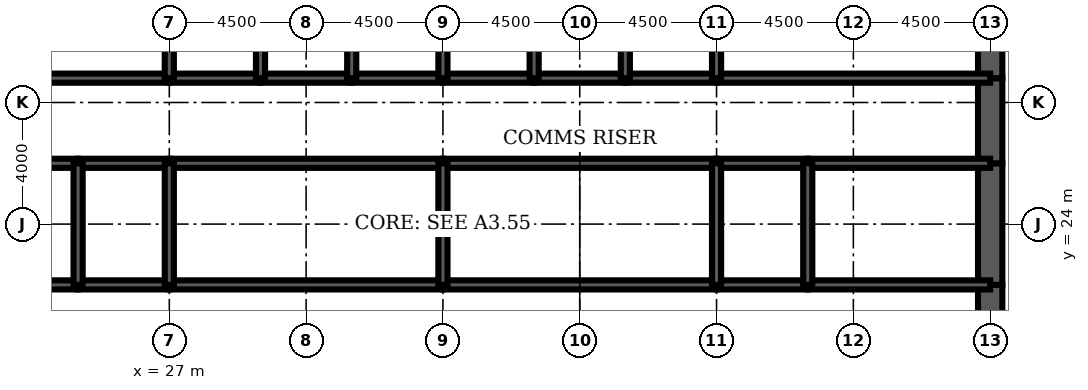
"""IFC4 building model, lengths in metres.
Left out: names, types, materials, properties, quantities, classifications, styles, units other than length and angle.
Written with IfcOpenShell. Run it as: python <this file> out.ifc"""

import sys

from ifc_helpers import new_model, si_unit, direction, frame, frame_2d, origin, place, context, subcontext, project, spatial, rectangle, extrude, element, fill, save


model = new_model("IFC4")
c1 = context("Model", 3, precision=1e-05, world=origin(), true_north=direction((0.0, 1.0)))
c2 = subcontext(c1, "Body", "Model", "MODEL_VIEW")
j1 = project(units=[si_unit("LENGTHUNIT", "METRE"), si_unit("PLANEANGLEUNIT", "RADIAN")], contexts=[c1])
p1 = place(None, origin())
s1 = spatial("IfcSite", under=j1, at=p1, CompositionType="ELEMENT")
p2 = place(p1, origin())
s2 = spatial("IfcBuilding", under=s1, at=p2, CompositionType="ELEMENT")
p3 = place(p2, frame((0.0, 0.0, 236.2)))
s3 = spatial("IfcBuildingStorey", under=s2, at=p3, CompositionType="ELEMENT", Elevation=236.2)
p4 = place(p3, frame((54.0, 19.2, 0.0), z_axis=(0.0, 0.0, 1.0), x_axis=(0.0, 1.0, 0.0)))
e1 = element("IfcWall", 1, at=p4, inside=s3, PredefinedType="SHEAR", context=c2, shape_type="SweptSolid", body=[
    extrude(rectangle(XDim=2.8, YDim=0.8, at=frame_2d((1.4, 0.0))), origin(), (0.0, 0.0, 1.0), 4.2),
])
p5 = place(p4, frame((0.4, 0.0, 0.0)))
e2 = element("IfcOpeningElement", 2, at=p5, cuts=e1, PredefinedType="OPENING", context=c2, shape_type="SweptSolid", body=[
    extrude(rectangle(XDim=1.8, YDim=2.1, at=frame_2d((0.9, 1.05))), frame((0.0, 0.41, 0.0), z_axis=(0.0, -1.0, 0.0), x_axis=(1.0, 0.0, 0.0)), (0.0, 0.0, 1.0), 0.82),
])
p6 = place(p3, frame((54.0, 22.0, 0.0), z_axis=(0.0, 0.0, 1.0), x_axis=(0.0, 1.0, 0.0)))
e3 = element("IfcWall", 3, at=p6, inside=s3, PredefinedType="SHEAR", context=c2, shape_type="SweptSolid", body=[
    extrude(rectangle(XDim=4.0, YDim=0.8, at=frame_2d((2.0, 0.0))), origin(), (0.0, 0.0, 1.0), 4.2),
])
p7 = place(p3, frame((54.0, 26.0, 0.0), z_axis=(0.0, 0.0, 1.0), x_axis=(0.0, 1.0, 0.0)))
e4 = element("IfcWall", 4, at=p7, inside=s3, PredefinedType="SHEAR", context=c2, shape_type="SweptSolid", body=[
    extrude(rectangle(XDim=2.8, YDim=0.8, at=frame_2d((1.4, 0.0))), origin(), (0.0, 0.0, 1.0), 4.2),
])
p8 = place(p7, frame((0.6, 0.0, 0.0)))
e5 = element("IfcOpeningElement", 5, at=p8, cuts=e4, PredefinedType="OPENING", context=c2, shape_type="SweptSolid", body=[
    extrude(rectangle(XDim=1.8, YDim=2.1, at=frame_2d((0.9, 1.05))), frame((0.0, 0.41, 0.0), z_axis=(0.0, -1.0, 0.0), x_axis=(1.0, 0.0, 0.0)), (0.0, 0.0, 1.0), 0.82),
])
p9 = place(p3, frame((54.0, 28.8, 0.0), z_axis=(0.0, 0.0, 1.0), x_axis=(0.0, 1.0, 0.0)))
e6 = element("IfcWall", 6, at=p9, inside=s3, PredefinedType="SHEAR", context=c2, shape_type="SweptSolid", body=[
    extrude(rectangle(XDim=3.2, YDim=0.8, at=frame_2d((1.6, 0.0))), origin(), (0.0, 0.0, 1.0), 4.2),
])
p10 = place(p3, frame((18.0, 28.8, 0.0), z_axis=(0.0, 0.0, 1.0), x_axis=(1.0, 0.0, 0.0)))
e7 = element("IfcWall", 7, at=p10, inside=s3, PredefinedType="SOLIDWALL", context=c2, shape_type="SweptSolid", body=[
    extrude(rectangle(XDim=9.0, YDim=0.3, at=frame_2d((4.5, 0.0))), origin(), (0.0, 0.0, 1.0), 4.2),
])
p11 = place(p10, frame((0.65, 0.0, 0.0)))
e8 = element("IfcOpeningElement", 8, at=p11, cuts=e7, PredefinedType="OPENING", context=c2, shape_type="SweptSolid", body=[
    extrude(rectangle(XDim=1.0, YDim=2.1, at=frame_2d((0.5, 1.05))), frame((0.0, 0.16, 0.0), z_axis=(0.0, -1.0, 0.0), x_axis=(1.0, 0.0, 0.0)), (0.0, 0.0, 1.0), 0.32),
])
p12 = place(p3, frame((27.0, 28.8, 0.0), z_axis=(0.0, 0.0, 1.0), x_axis=(1.0, 0.0, 0.0)))
e9 = element("IfcWall", 9, at=p12, inside=s3, PredefinedType="SOLIDWALL", context=c2, shape_type="SweptSolid", body=[
    extrude(rectangle(XDim=3.0, YDim=0.3, at=frame_2d((1.5, 0.0))), origin(), (0.0, 0.0, 1.0), 4.2),
])
p13 = place(p12, frame((0.95, 0.0, 0.0)))
e10 = element("IfcOpeningElement", 10, at=p13, cuts=e9, PredefinedType="OPENING", context=c2, shape_type="SweptSolid", body=[
    extrude(rectangle(XDim=1.1, YDim=2.2, at=frame_2d((0.55, 1.1))), frame((0.0, 0.16, 0.0), z_axis=(0.0, -1.0, 0.0), x_axis=(1.0, 0.0, 0.0)), (0.0, 0.0, 1.0), 0.32),
])
p14 = place(p3, frame((30.0, 28.8, 0.0), z_axis=(0.0, 0.0, 1.0), x_axis=(1.0, 0.0, 0.0)))
e11 = element("IfcWall", 11, at=p14, inside=s3, PredefinedType="SOLIDWALL", context=c2, shape_type="SweptSolid", body=[
    extrude(rectangle(XDim=3.0, YDim=0.3, at=frame_2d((1.5, 0.0))), origin(), (0.0, 0.0, 1.0), 4.2),
])
p15 = place(p14, frame((0.95, 0.0, 0.0)))
e12 = element("IfcOpeningElement", 12, at=p15, cuts=e11, PredefinedType="OPENING", context=c2, shape_type="SweptSolid", body=[
    extrude(rectangle(XDim=1.1, YDim=2.2, at=frame_2d((0.55, 1.1))), frame((0.0, 0.16, 0.0), z_axis=(0.0, -1.0, 0.0), x_axis=(1.0, 0.0, 0.0)), (0.0, 0.0, 1.0), 0.32),
])
p16 = place(p3, frame((33.0, 28.8, 0.0), z_axis=(0.0, 0.0, 1.0), x_axis=(1.0, 0.0, 0.0)))
e13 = element("IfcWall", 13, at=p16, inside=s3, PredefinedType="SOLIDWALL", context=c2, shape_type="SweptSolid", body=[
    extrude(rectangle(XDim=3.0, YDim=0.3, at=frame_2d((1.5, 0.0))), origin(), (0.0, 0.0, 1.0), 4.2),
])
p17 = place(p16, frame((0.95, 0.0, 0.0)))
e14 = element("IfcOpeningElement", 14, at=p17, cuts=e13, PredefinedType="OPENING", context=c2, shape_type="SweptSolid", body=[
    extrude(rectangle(XDim=1.1, YDim=2.2, at=frame_2d((0.55, 1.1))), frame((0.0, 0.16, 0.0), z_axis=(0.0, -1.0, 0.0), x_axis=(1.0, 0.0, 0.0)), (0.0, 0.0, 1.0), 0.32),
])
for number, where, z_axis, x_axis in (
    (15, (36.0, 28.8, 0.0), (0.0, 0.0, 1.0), (1.0, 0.0, 0.0)),
    (16, (39.0, 28.8, 0.0), (0.0, 0.0, 1.0), (1.0, 0.0, 0.0)),
):
    element("IfcWall", number, at=place(p3, frame(where, z_axis=z_axis, x_axis=x_axis)), inside=s3, PredefinedType="SOLIDWALL", context=c2, shape_type="SweptSolid", body=[
        extrude(rectangle(XDim=3.0, YDim=0.3, at=frame_2d((1.5, 0.0))), origin(), (0.0, 0.0, 1.0), 4.2),
    ])
p18 = place(p3, frame((42.0, 28.8, 0.0), z_axis=(0.0, 0.0, 1.0), x_axis=(1.0, 0.0, 0.0)))
e17 = element("IfcWall", 17, at=p18, inside=s3, PredefinedType="SOLIDWALL", context=c2, shape_type="SweptSolid", body=[
    extrude(rectangle(XDim=3.0, YDim=0.3, at=frame_2d((1.5, 0.0))), origin(), (0.0, 0.0, 1.0), 4.2),
])
p19 = place(p18, frame((0.95, 0.0, 0.0)))
e18 = element("IfcOpeningElement", 18, at=p19, cuts=e17, PredefinedType="OPENING", context=c2, shape_type="SweptSolid", body=[
    extrude(rectangle(XDim=1.1, YDim=2.2, at=frame_2d((0.55, 1.1))), frame((0.0, 0.16, 0.0), z_axis=(0.0, -1.0, 0.0), x_axis=(1.0, 0.0, 0.0)), (0.0, 0.0, 1.0), 0.32),
])
p20 = place(p3, frame((45.0, 28.8, 0.0), z_axis=(0.0, 0.0, 1.0), x_axis=(1.0, 0.0, 0.0)))
e19 = element("IfcWall", 19, at=p20, inside=s3, PredefinedType="SOLIDWALL", context=c2, shape_type="SweptSolid", body=[
    extrude(rectangle(XDim=9.0, YDim=0.3, at=frame_2d((4.5, 0.0))), origin(), (0.0, 0.0, 1.0), 4.2),
])
p21 = place(p20, frame((7.35, 0.0, 0.0)))
e20 = element("IfcOpeningElement", 20, at=p21, cuts=e19, PredefinedType="OPENING", context=c2, shape_type="SweptSolid", body=[
    extrude(rectangle(XDim=1.0, YDim=2.1, at=frame_2d((0.5, 1.05))), frame((0.0, 0.16, 0.0), z_axis=(0.0, -1.0, 0.0), x_axis=(1.0, 0.0, 0.0)), (0.0, 0.0, 1.0), 0.32),
])
p22 = place(p3, frame((18.0, 22.0, 0.0), z_axis=(0.0, 0.0, 1.0), x_axis=(1.0, 0.0, 0.0)))
e21 = element("IfcWall", 21, at=p22, inside=s3, PredefinedType="SOLIDWALL", context=c2, shape_type="SweptSolid", body=[
    extrude(rectangle(XDim=6.0, YDim=0.3, at=frame_2d((3.0, 0.0))), origin(), (0.0, 0.0, 1.0), 4.2),
])
p23 = place(p22, frame((4.4, 0.0, 0.0)))
e22 = element("IfcOpeningElement", 22, at=p23, cuts=e21, PredefinedType="OPENING", context=c2, shape_type="SweptSolid", body=[
    extrude(rectangle(XDim=1.0, YDim=2.1, at=frame_2d((0.5, 1.05))), frame((0.0, 0.16, 0.0), z_axis=(0.0, -1.0, 0.0), x_axis=(1.0, 0.0, 0.0)), (0.0, 0.0, 1.0), 0.32),
])
p24 = place(p22, frame((0.95, 0.0, 0.0)))
e23 = element("IfcOpeningElement", 23, at=p24, cuts=e21, PredefinedType="OPENING", context=c2, shape_type="SweptSolid", body=[
    extrude(rectangle(XDim=1.0, YDim=2.1, at=frame_2d((0.5, 1.05))), frame((0.0, 0.16, 0.0), z_axis=(0.0, -1.0, 0.0), x_axis=(1.0, 0.0, 0.0)), (0.0, 0.0, 1.0), 0.32),
])
p25 = place(p3, frame((24.0, 22.0, 0.0), z_axis=(0.0, 0.0, 1.0), x_axis=(1.0, 0.0, 0.0)))
e24 = element("IfcWall", 24, at=p25, inside=s3, PredefinedType="SOLIDWALL", context=c2, shape_type="SweptSolid", body=[
    extrude(rectangle(XDim=3.0, YDim=0.3, at=frame_2d((1.5, 0.0))), origin(), (0.0, 0.0, 1.0), 4.2),
])
p26 = place(p25, frame((1.0, 0.0, 0.0)))
e25 = element("IfcOpeningElement", 25, at=p26, cuts=e24, PredefinedType="OPENING", context=c2, shape_type="SweptSolid", body=[
    extrude(rectangle(XDim=1.0, YDim=2.1, at=frame_2d((0.5, 1.05))), frame((0.0, 0.16, 0.0), z_axis=(0.0, -1.0, 0.0), x_axis=(1.0, 0.0, 0.0)), (0.0, 0.0, 1.0), 0.32),
])
p27 = place(p3, frame((27.0, 22.0, 0.0), z_axis=(0.0, 0.0, 1.0), x_axis=(1.0, 0.0, 0.0)))
e26 = element("IfcWall", 26, at=p27, inside=s3, PredefinedType="SOLIDWALL", context=c2, shape_type="SweptSolid", body=[
    extrude(rectangle(XDim=9.0, YDim=0.3, at=frame_2d((4.5, 0.0))), origin(), (0.0, 0.0, 1.0), 4.2),
])
p28 = place(p27, frame((4.0, 0.0, 0.0)))
e27 = element("IfcOpeningElement", 27, at=p28, cuts=e26, PredefinedType="OPENING", context=c2, shape_type="SweptSolid", body=[
    extrude(rectangle(XDim=1.0, YDim=2.1, at=frame_2d((0.5, 1.05))), frame((0.0, 0.16, 0.0), z_axis=(0.0, -1.0, 0.0), x_axis=(1.0, 0.0, 0.0)), (0.0, 0.0, 1.0), 0.32),
])
p29 = place(p3, frame((36.0, 22.0, 0.0), z_axis=(0.0, 0.0, 1.0), x_axis=(1.0, 0.0, 0.0)))
e28 = element("IfcWall", 28, at=p29, inside=s3, PredefinedType="SOLIDWALL", context=c2, shape_type="SweptSolid", body=[
    extrude(rectangle(XDim=9.0, YDim=0.3, at=frame_2d((4.5, 0.0))), origin(), (0.0, 0.0, 1.0), 4.2),
])
p30 = place(p29, frame((4.0, 0.0, 0.0)))
e29 = element("IfcOpeningElement", 29, at=p30, cuts=e28, PredefinedType="OPENING", context=c2, shape_type="SweptSolid", body=[
    extrude(rectangle(XDim=1.0, YDim=2.1, at=frame_2d((0.5, 1.05))), frame((0.0, 0.16, 0.0), z_axis=(0.0, -1.0, 0.0), x_axis=(1.0, 0.0, 0.0)), (0.0, 0.0, 1.0), 0.32),
])
p31 = place(p3, frame((45.0, 22.0, 0.0), z_axis=(0.0, 0.0, 1.0), x_axis=(1.0, 0.0, 0.0)))
e30 = element("IfcWall", 30, at=p31, inside=s3, PredefinedType="SOLIDWALL", context=c2, shape_type="SweptSolid", body=[
    extrude(rectangle(XDim=3.0, YDim=0.3, at=frame_2d((1.5, 0.0))), origin(), (0.0, 0.0, 1.0), 4.2),
])
p32 = place(p31, frame((1.0, 0.0, 0.0)))
e31 = element("IfcOpeningElement", 31, at=p32, cuts=e30, PredefinedType="OPENING", context=c2, shape_type="SweptSolid", body=[
    extrude(rectangle(XDim=1.0, YDim=2.1, at=frame_2d((0.5, 1.05))), frame((0.0, 0.16, 0.0), z_axis=(0.0, -1.0, 0.0), x_axis=(1.0, 0.0, 0.0)), (0.0, 0.0, 1.0), 0.32),
])
p33 = place(p3, frame((48.0, 22.0, 0.0), z_axis=(0.0, 0.0, 1.0), x_axis=(1.0, 0.0, 0.0)))
e32 = element("IfcWall", 32, at=p33, inside=s3, PredefinedType="SOLIDWALL", context=c2, shape_type="SweptSolid", body=[
    extrude(rectangle(XDim=6.0, YDim=0.3, at=frame_2d((3.0, 0.0))), origin(), (0.0, 0.0, 1.0), 4.2),
])
p34 = place(p33, frame((2.0, 0.0, 0.0)))
e33 = element("IfcOpeningElement", 33, at=p34, cuts=e32, PredefinedType="OPENING", context=c2, shape_type="SweptSolid", body=[
    extrude(rectangle(XDim=1.0, YDim=2.1, at=frame_2d((0.5, 1.05))), frame((0.0, 0.16, 0.0), z_axis=(0.0, -1.0, 0.0), x_axis=(1.0, 0.0, 0.0)), (0.0, 0.0, 1.0), 0.32),
])
p35 = place(p33, frame((4.05, 0.0, 0.0)))
e34 = element("IfcOpeningElement", 34, at=p35, cuts=e32, PredefinedType="OPENING", context=c2, shape_type="SweptSolid", body=[
    extrude(rectangle(XDim=1.0, YDim=2.1, at=frame_2d((0.5, 1.05))), frame((0.0, 0.16, 0.0), z_axis=(0.0, -1.0, 0.0), x_axis=(1.0, 0.0, 0.0)), (0.0, 0.0, 1.0), 0.32),
])
p36 = place(p3, frame((18.0, 26.0, 0.0), z_axis=(0.0, 0.0, 1.0), x_axis=(1.0, 0.0, 0.0)))
e35 = element("IfcWall", 35, at=p36, inside=s3, PredefinedType="SOLIDWALL", context=c2, shape_type="SweptSolid", body=[
    extrude(rectangle(XDim=6.0, YDim=0.3, at=frame_2d((3.0, 0.0))), origin(), (0.0, 0.0, 1.0), 4.2),
])
p37 = place(p3, frame((24.0, 26.0, 0.0), z_axis=(0.0, 0.0, 1.0), x_axis=(1.0, 0.0, 0.0)))
e36 = element("IfcWall", 36, at=p37, inside=s3, PredefinedType="SOLIDWALL", context=c2, shape_type="SweptSolid", body=[
    extrude(rectangle(XDim=3.0, YDim=0.3, at=frame_2d((1.5, 0.0))), origin(), (0.0, 0.0, 1.0), 4.2),
])
for number, where, z_axis, x_axis in (
    (37, (27.0, 26.0, 0.0), (0.0, 0.0, 1.0), (1.0, 0.0, 0.0)),
    (38, (36.0, 26.0, 0.0), (0.0, 0.0, 1.0), (1.0, 0.0, 0.0)),
):
    element("IfcWall", number, at=place(p3, frame(where, z_axis=z_axis, x_axis=x_axis)), inside=s3, PredefinedType="SOLIDWALL", context=c2, shape_type="SweptSolid", body=[
        extrude(rectangle(XDim=9.0, YDim=0.3, at=frame_2d((4.5, 0.0))), origin(), (0.0, 0.0, 1.0), 4.2),
    ])
p38 = place(p3, frame((45.0, 26.0, 0.0), z_axis=(0.0, 0.0, 1.0), x_axis=(1.0, 0.0, 0.0)))
e39 = element("IfcWall", 39, at=p38, inside=s3, PredefinedType="SOLIDWALL", context=c2, shape_type="SweptSolid", body=[
    extrude(rectangle(XDim=3.0, YDim=0.3, at=frame_2d((1.5, 0.0))), origin(), (0.0, 0.0, 1.0), 4.2),
])
p39 = place(p3, frame((48.0, 26.0, 0.0), z_axis=(0.0, 0.0, 1.0), x_axis=(1.0, 0.0, 0.0)))
e40 = element("IfcWall", 40, at=p39, inside=s3, PredefinedType="SOLIDWALL", context=c2, shape_type="SweptSolid", body=[
    extrude(rectangle(XDim=6.0, YDim=0.3, at=frame_2d((3.0, 0.0))), origin(), (0.0, 0.0, 1.0), 4.2),
])
for number, where, z_axis, x_axis in (
    (41, (27.0, 28.8, 0.0), (0.0, 0.0, 1.0), (0.0, 1.0, 0.0)),
    (42, (30.0, 28.8, 0.0), (0.0, 0.0, 1.0), (0.0, 1.0, 0.0)),
    (43, (33.0, 28.8, 0.0), (0.0, 0.0, 1.0), (0.0, 1.0, 0.0)),
    (44, (36.0, 28.8, 0.0), (0.0, 0.0, 1.0), (0.0, 1.0, 0.0)),
    (45, (39.0, 28.8, 0.0), (0.0, 0.0, 1.0), (0.0, 1.0, 0.0)),
    (46, (42.0, 28.8, 0.0), (0.0, 0.0, 1.0), (0.0, 1.0, 0.0)),
    (47, (45.0, 28.8, 0.0), (0.0, 0.0, 1.0), (0.0, 1.0, 0.0)),
):
    element("IfcWall", number, at=place(p3, frame(where, z_axis=z_axis, x_axis=x_axis)), inside=s3, PredefinedType="SOLIDWALL", context=c2, shape_type="SweptSolid", body=[
        extrude(rectangle(XDim=3.2, YDim=0.3, at=frame_2d((1.6, 0.0))), origin(), (0.0, 0.0, 1.0), 4.2),
    ])
for number, where, z_axis, x_axis in (
    (48, (24.0, 22.0, 0.0), (0.0, 0.0, 1.0), (0.0, 1.0, 0.0)),
    (49, (27.0, 22.0, 0.0), (0.0, 0.0, 1.0), (0.0, 1.0, 0.0)),
    (50, (36.0, 22.0, 0.0), (0.0, 0.0, 1.0), (0.0, 1.0, 0.0)),
    (51, (45.0, 22.0, 0.0), (0.0, 0.0, 1.0), (0.0, 1.0, 0.0)),
    (52, (48.0, 22.0, 0.0), (0.0, 0.0, 1.0), (0.0, 1.0, 0.0)),
):
    element("IfcWall", number, at=place(p3, frame(where, z_axis=z_axis, x_axis=x_axis)), inside=s3, PredefinedType="SOLIDWALL", context=c2, shape_type="SweptSolid", body=[
        extrude(rectangle(XDim=4.0, YDim=0.3, at=frame_2d((2.0, 0.0))), origin(), (0.0, 0.0, 1.0), 4.2),
    ])
p40 = place(p3, frame((51.425, 22.15, 0.0), z_axis=(0.0, 0.0, 1.0), x_axis=(0.0, 1.0, 0.0)))
e53 = element("IfcWall", 53, at=p40, inside=s3, PredefinedType="PARTITIONING", context=c2, shape_type="SweptSolid", body=[
    extrude(rectangle(XDim=3.7, YDim=0.15, at=frame_2d((1.85, 0.0))), origin(), (0.0, 0.0, 1.0), 3.0),
])
p41 = place(p3, frame((47.7, 26.15, 0.0), z_axis=(0.0, 0.0, 1.0), x_axis=(0.0, 1.0, 0.0)))
e54 = element("IfcWall", 54, at=p41, inside=s3, PredefinedType="PARTITIONING", context=c2, shape_type="SweptSolid", body=[
    extrude(rectangle(XDim=2.5, YDim=0.15, at=frame_2d((1.25, 0.0))), origin(), (0.0, 0.0, 1.0), 3.0),
])
p42 = place(p41, frame((1.15, 0.0, 0.0)))
e55 = element("IfcOpeningElement", 55, at=p42, cuts=e54, PredefinedType="OPENING", context=c2, shape_type="SweptSolid", body=[
    extrude(rectangle(XDim=1.0, YDim=2.1, at=frame_2d((0.5, 1.05))), frame((0.0, 0.085, 0.0), z_axis=(0.0, -1.0, 0.0), x_axis=(1.0, 0.0, 0.0)), (0.0, 0.0, 1.0), 0.17),
])
p43 = place(p3, frame((24.5, 19.35, 0.0), z_axis=(0.0, 0.0, 1.0), x_axis=(0.0, 1.0, 0.0)))
e56 = element("IfcWall", 56, at=p43, inside=s3, PredefinedType="PARTITIONING", context=c2, shape_type="SweptSolid", body=[
    extrude(rectangle(XDim=2.5, YDim=0.15, at=frame_2d((1.25, 0.0))), origin(), (0.0, 0.0, 1.0), 3.0),
])
p44 = place(p43, frame((1.15, 0.0, 0.0)))
e57 = element("IfcOpeningElement", 57, at=p44, cuts=e56, PredefinedType="OPENING", context=c2, shape_type="SweptSolid", body=[
    extrude(rectangle(XDim=1.0, YDim=2.1, at=frame_2d((0.5, 1.05))), frame((0.0, 0.085, 0.0), z_axis=(0.0, -1.0, 0.0), x_axis=(1.0, 0.0, 0.0)), (0.0, 0.0, 1.0), 0.17),
])
p45 = place(p42, origin())
e58 = element("IfcDoor", 58, at=p45, inside=s3, OperationType="SINGLE_SWING_RIGHT", PredefinedType="DOOR", context=c2, shape_type="SweptSolid", body=[
    extrude(rectangle(XDim=1.0, YDim=2.1, at=frame_2d((0.5, 1.05))), frame((0.0, 0.025, 0.0), z_axis=(0.0, -1.0, 0.0), x_axis=(1.0, 0.0, 0.0)), (0.0, 0.0, 1.0), 0.05),
])
fill(e55, e58)
p46 = place(p44, origin())
e59 = element("IfcDoor", 59, at=p46, inside=s3, OperationType="SINGLE_SWING_RIGHT", PredefinedType="DOOR", context=c2, shape_type="SweptSolid", body=[
    extrude(rectangle(XDim=1.0, YDim=2.1, at=frame_2d((0.5, 1.05))), frame((0.0, 0.025, 0.0), z_axis=(0.0, -1.0, 0.0), x_axis=(1.0, 0.0, 0.0)), (0.0, 0.0, 1.0), 0.05),
])
fill(e57, e59)
p47 = place(p19, origin())
e60 = element("IfcDoor", 60, at=p47, inside=s3, OperationType="DOUBLE_DOOR_SLIDING", PredefinedType="USERDEFINED", context=c2, shape_type="SweptSolid", body=[
    extrude(rectangle(XDim=1.1, YDim=2.2, at=frame_2d((0.55, 1.1))), frame((0.0, 0.025, 0.0), z_axis=(0.0, -1.0, 0.0), x_axis=(1.0, 0.0, 0.0)), (0.0, 0.0, 1.0), 0.05),
])
fill(e18, e60)
p48 = place(p13, origin())
e61 = element("IfcDoor", 61, at=p48, inside=s3, OperationType="DOUBLE_DOOR_SLIDING", PredefinedType="USERDEFINED", context=c2, shape_type="SweptSolid", body=[
    extrude(rectangle(XDim=1.1, YDim=2.2, at=frame_2d((0.55, 1.1))), frame((0.0, 0.025, 0.0), z_axis=(0.0, -1.0, 0.0), x_axis=(1.0, 0.0, 0.0)), (0.0, 0.0, 1.0), 0.05),
])
fill(e10, e61)
p49 = place(p15, origin())
e62 = element("IfcDoor", 62, at=p49, inside=s3, OperationType="DOUBLE_DOOR_SLIDING", PredefinedType="USERDEFINED", context=c2, shape_type="SweptSolid", body=[
    extrude(rectangle(XDim=1.1, YDim=2.2, at=frame_2d((0.55, 1.1))), frame((0.0, 0.025, 0.0), z_axis=(0.0, -1.0, 0.0), x_axis=(1.0, 0.0, 0.0)), (0.0, 0.0, 1.0), 0.05),
])
fill(e12, e62)
p50 = place(p17, origin())
e63 = element("IfcDoor", 63, at=p50, inside=s3, OperationType="DOUBLE_DOOR_SLIDING", PredefinedType="USERDEFINED", context=c2, shape_type="SweptSolid", body=[
    extrude(rectangle(XDim=1.1, YDim=2.2, at=frame_2d((0.55, 1.1))), frame((0.0, 0.025, 0.0), z_axis=(0.0, -1.0, 0.0), x_axis=(1.0, 0.0, 0.0)), (0.0, 0.0, 1.0), 0.05),
])
fill(e14, e63)
p51 = place(p21, origin())
e64 = element("IfcDoor", 64, at=p51, inside=s3, OperationType="SINGLE_SWING_RIGHT", PredefinedType="DOOR", context=c2, shape_type="SweptSolid", body=[
    extrude(rectangle(XDim=1.0, YDim=2.1, at=frame_2d((0.5, 1.05))), frame((0.0, 0.025, 0.0), z_axis=(0.0, -1.0, 0.0), x_axis=(1.0, 0.0, 0.0)), (0.0, 0.0, 1.0), 0.05),
])
fill(e20, e64)
p52 = place(p5, origin())
e65 = element("IfcDoor", 65, at=p52, inside=s3, OperationType="SINGLE_SWING_LEFT", PredefinedType="DOOR", context=c2, shape_type="SweptSolid", body=[
    extrude(rectangle(XDim=1.8, YDim=2.1, at=frame_2d((0.9, 1.05))), frame((0.0, 0.4, 0.0), z_axis=(0.0, -1.0, 0.0), x_axis=(1.0, 0.0, 0.0)), (0.0, 0.0, 1.0), 0.8),
])
fill(e2, e65)
p53 = place(p8, origin())
e66 = element("IfcDoor", 66, at=p53, inside=s3, OperationType="SINGLE_SWING_LEFT", PredefinedType="DOOR", context=c2, shape_type="SweptSolid", body=[
    extrude(rectangle(XDim=1.8, YDim=2.1, at=frame_2d((0.9, 1.05))), frame((0.0, 0.4, 0.0), z_axis=(0.0, -1.0, 0.0), x_axis=(1.0, 0.0, 0.0)), (0.0, 0.0, 1.0), 0.8),
])
fill(e5, e66)
p54 = place(p23, origin())
e67 = element("IfcDoor", 67, at=p54, inside=s3, OperationType="SINGLE_SWING_RIGHT", PredefinedType="DOOR", context=c2, shape_type="SweptSolid", body=[
    extrude(rectangle(XDim=1.0, YDim=2.1, at=frame_2d((0.5, 1.05))), frame((0.0, 0.025, 0.0), z_axis=(0.0, -1.0, 0.0), x_axis=(1.0, 0.0, 0.0)), (0.0, 0.0, 1.0), 0.05),
])
fill(e22, e67)
p55 = place(p26, origin())
e68 = element("IfcDoor", 68, at=p55, inside=s3, OperationType="SINGLE_SWING_LEFT", PredefinedType="DOOR", context=c2, shape_type="SweptSolid", body=[
    extrude(rectangle(XDim=1.0, YDim=2.1, at=frame_2d((0.5, 1.05))), frame((0.0, 0.025, 0.0), z_axis=(0.0, -1.0, 0.0), x_axis=(1.0, 0.0, 0.0)), (0.0, 0.0, 1.0), 0.05),
])
fill(e25, e68)
p56 = place(p28, origin())
e69 = element("IfcDoor", 69, at=p56, inside=s3, OperationType="SINGLE_SWING_LEFT", PredefinedType="DOOR", context=c2, shape_type="SweptSolid", body=[
    extrude(rectangle(XDim=1.0, YDim=2.1, at=frame_2d((0.5, 1.05))), frame((0.0, 0.025, 0.0), z_axis=(0.0, -1.0, 0.0), x_axis=(1.0, 0.0, 0.0)), (0.0, 0.0, 1.0), 0.05),
])
fill(e27, e69)
p57 = place(p30, origin())
e70 = element("IfcDoor", 70, at=p57, inside=s3, OperationType="SINGLE_SWING_LEFT", PredefinedType="DOOR", context=c2, shape_type="SweptSolid", body=[
    extrude(rectangle(XDim=1.0, YDim=2.1, at=frame_2d((0.5, 1.05))), frame((0.0, 0.025, 0.0), z_axis=(0.0, -1.0, 0.0), x_axis=(1.0, 0.0, 0.0)), (0.0, 0.0, 1.0), 0.05),
])
fill(e29, e70)
p58 = place(p32, origin())
e71 = element("IfcDoor", 71, at=p58, inside=s3, OperationType="SINGLE_SWING_LEFT", PredefinedType="DOOR", context=c2, shape_type="SweptSolid", body=[
    extrude(rectangle(XDim=1.0, YDim=2.1, at=frame_2d((0.5, 1.05))), frame((0.0, 0.025, 0.0), z_axis=(0.0, -1.0, 0.0), x_axis=(1.0, 0.0, 0.0)), (0.0, 0.0, 1.0), 0.05),
])
fill(e31, e71)
p59 = place(p34, origin())
e72 = element("IfcDoor", 72, at=p59, inside=s3, OperationType="SINGLE_SWING_LEFT", PredefinedType="DOOR", context=c2, shape_type="SweptSolid", body=[
    extrude(rectangle(XDim=1.0, YDim=2.1, at=frame_2d((0.5, 1.05))), frame((0.0, 0.025, 0.0), z_axis=(0.0, -1.0, 0.0), x_axis=(1.0, 0.0, 0.0)), (0.0, 0.0, 1.0), 0.05),
])
fill(e33, e72)
p60 = place(p35, origin())
e73 = element("IfcDoor", 73, at=p60, inside=s3, OperationType="SINGLE_SWING_RIGHT", PredefinedType="DOOR", context=c2, shape_type="SweptSolid", body=[
    extrude(rectangle(XDim=1.0, YDim=2.1, at=frame_2d((0.5, 1.05))), frame((0.0, 0.025, 0.0), z_axis=(0.0, -1.0, 0.0), x_axis=(1.0, 0.0, 0.0)), (0.0, 0.0, 1.0), 0.05),
])
fill(e34, e73)
save(model, sys.argv[1])
